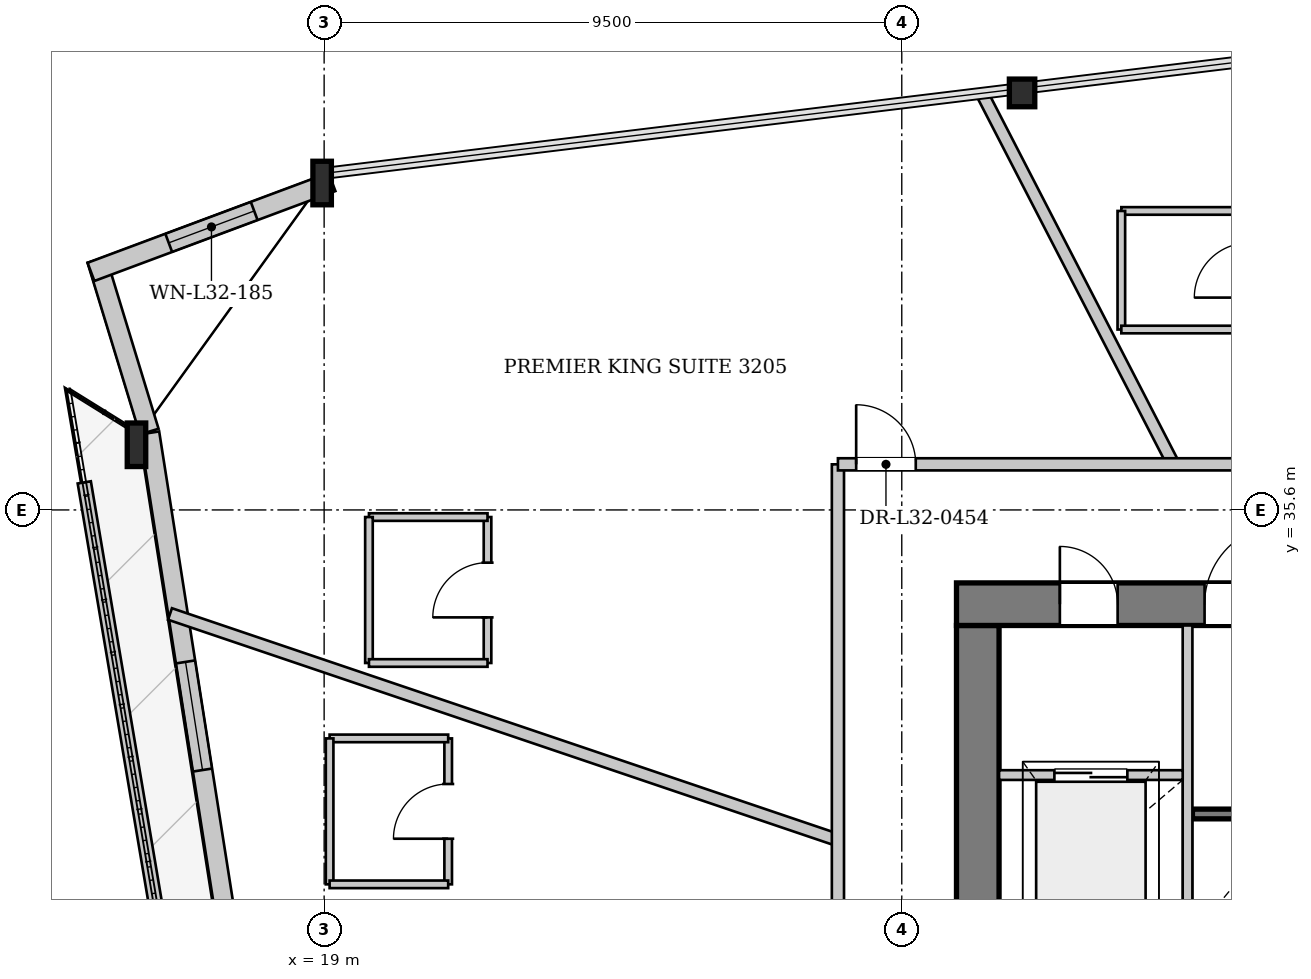
"""IFC4 building model, lengths in metres.
Left out: names, types, materials, properties, quantities, classifications, styles, units other than length and angle.
Written with IfcOpenShell. Run it as: python <this file> out.ifc"""

import sys

from ifc_helpers import new_model, si_unit, direction, frame, frame_2d, origin, origin_2d, place, context, subcontext, project, spatial, rectangle, i_section, extrude, source, transform, mapped, element, fill, save


model = new_model("IFC4")
c1 = context("Model", 3, precision=1e-05, world=origin(), true_north=direction((0.0, 1.0)))
c2 = subcontext(c1, "Body", "Model", "MODEL_VIEW")
j1 = project(units=[si_unit("LENGTHUNIT", "METRE"), si_unit("PLANEANGLEUNIT", "RADIAN")], contexts=[c1])
p1 = place(None, origin())
s1 = spatial("IfcSite", under=j1, at=p1, CompositionType="ELEMENT")
p2 = place(p1, origin())
s2 = spatial("IfcBuilding", under=s1, at=p2, CompositionType="ELEMENT")
p3 = place(p2, frame((0.0, 0.0, 123.45)))
s3 = spatial("IfcBuildingStorey", under=s2, at=p3, CompositionType="ELEMENT", Elevation=123.45)
m1 = source(origin(), c2, "Body", "SweptSolid", [
    extrude(i_section(OverallWidth=0.418, OverallDepth=0.455, WebThickness=0.038, FlangeThickness=0.059, at=origin_2d()), origin(), (0.0, 0.0, 1.0), 3.399),
])
p4 = place(p3, frame((30.602, 42.548, 0.0), z_axis=(-0.072908989981, -0.052724333641, 0.995943986287), x_axis=(0.585985969576, -0.810321197711, 0.0)))
e1 = element("IfcColumn", 1, at=p4, inside=s3, PredefinedType="COLUMN", context=c2, shape_type="MappedRepresentation", body=[
    mapped(m1, transform((0.0, 0.0, 0.0), x_axis=(1.0, 0.0, 0.0), y_axis=(0.0, 1.0, 0.0), z_axis=(0.0, 0.0, 1.0), scale=1.0)),
])
m2 = source(origin(), c2, "Body", "SweptSolid", [
    extrude(i_section(OverallWidth=0.304, OverallDepth=0.716, WebThickness=0.021, FlangeThickness=0.04, at=origin_2d()), origin(), (0.0, 0.0, 1.0), 3.408),
])
p5 = place(p3, frame((19.073, 41.144, 0.0), z_axis=(-0.06224977638, -0.098353214005, 0.993202703699), x_axis=(0.844976677144, -0.534803155454, 0.0)))
e2 = element("IfcColumn", 2, at=p5, inside=s3, PredefinedType="COLUMN", context=c2, shape_type="MappedRepresentation", body=[
    mapped(m2, transform((0.0, 0.0, 0.0), x_axis=(1.0, 0.0, 0.0), y_axis=(0.0, 1.0, 0.0), z_axis=(0.0, 0.0, 1.0), scale=1.0)),
])
m3 = source(origin(), c2, "Body", "SweptSolid", [
    extrude(i_section(OverallWidth=0.304, OverallDepth=0.716, WebThickness=0.021, FlangeThickness=0.04, at=origin_2d()), origin(), (0.0, 0.0, 1.0), 3.404),
])
p6 = place(p3, frame((15.971, 36.842, 0.0), z_axis=(-0.033494892307, -0.099767441541, 0.994446856196), x_axis=(0.947999571076, -0.318271602942, 0.0)))
e3 = element("IfcColumn", 3, at=p6, inside=s3, PredefinedType="COLUMN", context=c2, shape_type="MappedRepresentation", body=[
    mapped(m3, transform((0.0, 0.0, 0.0), x_axis=(1.0, 0.0, 0.0), y_axis=(0.0, 1.0, 0.0), z_axis=(0.0, 0.0, 1.0), scale=1.0)),
])
p7 = place(p3, frame((18.941, 18.965, 0.0), z_axis=(0.0, 0.0, 1.0), x_axis=(-0.155167584453, 0.987888162058, 0.0)))
e4 = element("IfcWall", 4, at=p7, inside=s3, PredefinedType="SOLIDWALL", context=c2, shape_type="SweptSolid", body=[
    extrude(rectangle(XDim=18.121, YDim=0.32, at=frame_2d((9.061, 0.0))), origin(), (0.0, 0.0, 1.0), 2.692),
])
p8 = place(p7, frame((5.249, 0.0, 0.0)))
e5 = element("IfcOpeningElement", 5, at=p8, cuts=e4, PredefinedType="OPENING", context=c2, shape_type="SweptSolid", body=[
    extrude(rectangle(XDim=1.1, YDim=2.3, at=frame_2d((0.55, 1.15))), frame((0.0, 0.17, 0.0), z_axis=(0.0, -1.0, 0.0), x_axis=(1.0, 0.0, 0.0)), (0.0, 0.0, 1.0), 0.34),
])
p9 = place(p7, frame((12.509, 0.0, 0.372)))
e6 = element("IfcOpeningElement", 6, at=p9, cuts=e4, PredefinedType="OPENING", context=c2, shape_type="SweptSolid", body=[
    extrude(rectangle(XDim=1.8, YDim=2.2, at=frame_2d((0.9, 1.1))), frame((0.0, 0.17, 0.0), z_axis=(0.0, -1.0, 0.0), x_axis=(1.0, 0.0, 0.0)), (0.0, 0.0, 1.0), 0.34),
])
p10 = place(p3, frame((16.124, 36.888, 0.0), z_axis=(0.0, 0.0, 1.0), x_axis=(-0.29180664309, 0.956477330128, 0.0)))
e7 = element("IfcWall", 7, at=p10, inside=s3, PredefinedType="SOLIDWALL", context=c2, shape_type="SweptSolid", body=[
    extrude(rectangle(XDim=2.952, YDim=0.32, at=frame_2d((1.476, 0.0))), origin(), (0.0, 0.0, 1.0), 2.692),
])
p11 = place(p3, frame((15.165, 39.515, 0.0), z_axis=(0.0, 0.0, 1.0), x_axis=(0.936906542146, 0.349579935472, 0.0)))
e8 = element("IfcWall", 8, at=p11, inside=s3, PredefinedType="SOLIDWALL", context=c2, shape_type="SweptSolid", body=[
    extrude(rectangle(XDim=4.231, YDim=0.32, at=frame_2d((2.115, 0.0))), origin(), (0.0, 0.0, 1.0), 2.692),
])
p12 = place(p11, frame((1.365, 0.0, 0.272)))
e9 = element("IfcOpeningElement", 9, at=p12, cuts=e8, PredefinedType="OPENING", context=c2, shape_type="SweptSolid", body=[
    extrude(rectangle(XDim=1.5, YDim=2.3, at=frame_2d((0.75, 1.15))), frame((0.0, 0.17, 0.0), z_axis=(0.0, -1.0, 0.0), x_axis=(1.0, 0.0, 0.0)), (0.0, 0.0, 1.0), 0.34),
])
p13 = place(p3, frame((15.055, 36.053, 0.0), z_axis=(0.0, 0.0, 1.0), x_axis=(0.166510572337, -0.986039669232, 0.0)))
e10 = element("IfcWall", 10, at=p13, inside=s3, PredefinedType="PARAPET", context=c2, shape_type="SweptSolid", body=[
    extrude(rectangle(XDim=16.14, YDim=0.22, at=frame_2d((8.07, 0.0))), origin(), (0.0, 0.0, 1.0), 0.3),
])
p14 = place(p3, frame((29.75, 19.5, 0.0), z_axis=(0.0, 0.0, 1.0), x_axis=(0.0, 1.0, 0.0)))
e11 = element("IfcWall", 11, at=p14, inside=s3, PredefinedType="SHEAR", context=c2, shape_type="SweptSolid", body=[
    extrude(rectangle(XDim=14.2, YDim=0.7, at=frame_2d((7.1, 0.0))), origin(), (0.0, 0.0, 1.0), 3.3),
])
p15 = place(p14, frame((7.42, 0.0, 0.0)))
e12 = element("IfcOpeningElement", 12, at=p15, cuts=e11, PredefinedType="OPENING", context=c2, shape_type="SweptSolid", body=[
    extrude(rectangle(XDim=1.6, YDim=2.2, at=frame_2d((0.8, 1.1))), frame((0.0, 0.36, 0.0), z_axis=(0.0, -1.0, 0.0), x_axis=(1.0, 0.0, 0.0)), (0.0, 0.0, 1.0), 0.72),
])
p16 = place(p3, frame((29.4, 34.05, 0.0), z_axis=(0.0, 0.0, 1.0), x_axis=(1.0, 0.0, 0.0)))
e13 = element("IfcWall", 13, at=p16, inside=s3, PredefinedType="SHEAR", context=c2, shape_type="SweptSolid", body=[
    extrude(rectangle(XDim=17.2, YDim=0.7, at=frame_2d((8.6, 0.0))), origin(), (0.0, 0.0, 1.0), 3.3),
])
p17 = place(p16, frame((1.7, 0.0, 0.0)))
e14 = element("IfcOpeningElement", 14, at=p17, cuts=e13, PredefinedType="OPENING", context=c2, shape_type="SweptSolid", body=[
    extrude(rectangle(XDim=0.95, YDim=2.1, at=frame_2d((0.475, 1.05))), frame((0.0, 0.36, 0.0), z_axis=(0.0, -1.0, 0.0), x_axis=(1.0, 0.0, 0.0)), (0.0, 0.0, 1.0), 0.72),
])
p18 = place(p16, frame((4.08, 0.0, 0.0)))
e15 = element("IfcOpeningElement", 15, at=p18, cuts=e13, PredefinedType="OPENING", context=c2, shape_type="SweptSolid", body=[
    extrude(rectangle(XDim=1.32, YDim=2.2, at=frame_2d((0.66, 1.1))), frame((0.0, 0.36, 0.0), z_axis=(0.0, -1.0, 0.0), x_axis=(1.0, 0.0, 0.0)), (0.0, 0.0, 1.0), 0.72),
])
p19 = place(p16, frame((15.15, 0.0, 0.0)))
e16 = element("IfcOpeningElement", 16, at=p19, cuts=e13, PredefinedType="OPENING", context=c2, shape_type="SweptSolid", body=[
    extrude(rectangle(XDim=0.95, YDim=2.1, at=frame_2d((0.475, 1.05))), frame((0.0, 0.36, 0.0), z_axis=(0.0, -1.0, 0.0), x_axis=(1.0, 0.0, 0.0)), (0.0, 0.0, 1.0), 0.72),
])
p20 = place(p3, frame((33.28, 30.6, 0.0), z_axis=(0.0, 0.0, 1.0), x_axis=(1.0, 0.0, 0.0)))
e17 = element("IfcWall", 17, at=p20, inside=s3, PredefinedType="PARTITIONING", context=c2, shape_type="SweptSolid", body=[
    extrude(rectangle(XDim=7.3, YDim=0.16, at=frame_2d((3.65, 0.0))), origin(), (0.0, 0.0, 1.0), 3.3),
])
p21 = place(p3, frame((33.2, 28.44, 0.0), z_axis=(0.0, 0.0, 1.0), x_axis=(0.0, 1.0, 0.0)))
e18 = element("IfcWall", 18, at=p21, inside=s3, PredefinedType="PARTITIONING", context=c2, shape_type="SweptSolid", body=[
    extrude(rectangle(XDim=5.26, YDim=0.16, at=frame_2d((2.63, 0.0))), origin(), (0.0, 0.0, 1.0), 3.3),
])
p22 = place(p3, frame((30.1, 31.24, 0.0), z_axis=(0.0, 0.0, 1.0), x_axis=(1.0, 0.0, 0.0)))
e19 = element("IfcWall", 19, at=p22, inside=s3, PredefinedType="PARTITIONING", context=c2, shape_type="SweptSolid", body=[
    extrude(rectangle(XDim=3.02, YDim=0.16, at=frame_2d((1.51, 0.0))), origin(), (0.0, 0.0, 1.0), 3.3),
])
p23 = place(p22, frame((0.91, 0.0, 0.0)))
e20 = element("IfcOpeningElement", 20, at=p23, cuts=e19, PredefinedType="OPENING", context=c2, shape_type="SweptSolid", body=[
    extrude(rectangle(XDim=1.2, YDim=2.2, at=frame_2d((0.6, 1.1))), frame((0.0, 0.09, 0.0), z_axis=(0.0, -1.0, 0.0), x_axis=(1.0, 0.0, 0.0)), (0.0, 0.0, 1.0), 0.18),
])
p24 = place(p3, frame((32.968, 36.35, 0.0), z_axis=(0.0, 0.0, 1.0), x_axis=(-0.458650198855, 0.88861690007, 0.0)))
e21 = element("IfcWall", 21, at=p24, inside=s3, PredefinedType="PARTITIONING", context=c2, shape_type="SweptSolid", body=[
    extrude(rectangle(XDim=6.835, YDim=0.2, at=frame_2d((3.417, 0.0))), origin(), (0.0, 0.0, 1.0), 3.3),
])
p25 = place(p3, frame((27.45, 30.171, 0.0), z_axis=(0.0, 0.0, 1.0), x_axis=(-0.947210068389, 0.320613609103, 0.0)))
e22 = element("IfcWall", 22, at=p25, inside=s3, PredefinedType="PARTITIONING", context=c2, shape_type="SweptSolid", body=[
    extrude(rectangle(XDim=11.597, YDim=0.2, at=frame_2d((5.799, 0.0))), origin(), (0.0, 0.0, 1.0), 3.3),
])
p26 = place(p3, frame((34.211, 40.517, 0.0), z_axis=(0.0, 0.0, 1.0), x_axis=(-1.0, 0.0, 0.0)))
e23 = element("IfcWall", 23, at=p26, inside=s3, PredefinedType="PARTITIONING", context=c2, shape_type="SweptSolid", body=[
    extrude(rectangle(XDim=2.1, YDim=0.125, at=frame_2d((1.05, 0.0))), origin(), (0.0, 0.0, 1.0), 3.3),
])
p27 = place(p3, frame((32.111, 40.517, 0.0), z_axis=(0.0, 0.0, 1.0), x_axis=(0.0, -1.0, 0.0)))
e24 = element("IfcWall", 24, at=p27, inside=s3, PredefinedType="PARTITIONING", context=c2, shape_type="SweptSolid", body=[
    extrude(rectangle(XDim=1.95, YDim=0.125, at=frame_2d((0.975, 0.0))), origin(), (0.0, 0.0, 1.0), 3.3),
])
p28 = place(p3, frame((32.111, 38.567, 0.0), z_axis=(0.0, 0.0, 1.0), x_axis=(1.0, 0.0, 0.0)))
e25 = element("IfcWall", 25, at=p28, inside=s3, PredefinedType="PARTITIONING", context=c2, shape_type="SweptSolid", body=[
    extrude(rectangle(XDim=2.1, YDim=0.125, at=frame_2d((1.05, 0.0))), origin(), (0.0, 0.0, 1.0), 3.3),
])
p29 = place(p3, frame((21.687, 33.083, 0.0), z_axis=(0.0, 0.0, 1.0), x_axis=(0.0, 1.0, 0.0)))
e26 = element("IfcWall", 26, at=p29, inside=s3, PredefinedType="PARTITIONING", context=c2, shape_type="SweptSolid", body=[
    extrude(rectangle(XDim=2.4, YDim=0.125, at=frame_2d((1.2, 0.0))), origin(), (0.0, 0.0, 1.0), 2.925),
])
p30 = place(p29, frame((0.75, 0.0, 0.0)))
e27 = element("IfcOpeningElement", 27, at=p30, cuts=e26, PredefinedType="OPENING", context=c2, shape_type="SweptSolid", body=[
    extrude(rectangle(XDim=0.9, YDim=2.1, at=frame_2d((0.45, 1.05))), frame((0.0, 0.073, 0.0), z_axis=(0.0, -1.0, 0.0), x_axis=(1.0, 0.0, 0.0)), (0.0, 0.0, 1.0), 0.145),
])
p31 = place(p3, frame((21.687, 35.483, 0.0), z_axis=(0.0, 0.0, 1.0), x_axis=(-1.0, 0.0, 0.0)))
e28 = element("IfcWall", 28, at=p31, inside=s3, PredefinedType="PARTITIONING", context=c2, shape_type="SweptSolid", body=[
    extrude(rectangle(XDim=1.95, YDim=0.125, at=frame_2d((0.975, 0.0))), origin(), (0.0, 0.0, 1.0), 3.3),
])
p32 = place(p3, frame((19.737, 35.483, 0.0), z_axis=(0.0, 0.0, 1.0), x_axis=(0.0, -1.0, 0.0)))
e29 = element("IfcWall", 29, at=p32, inside=s3, PredefinedType="PARTITIONING", context=c2, shape_type="SweptSolid", body=[
    extrude(rectangle(XDim=2.4, YDim=0.125, at=frame_2d((1.2, 0.0))), origin(), (0.0, 0.0, 1.0), 3.3),
])
p33 = place(p3, frame((19.737, 33.083, 0.0), z_axis=(0.0, 0.0, 1.0), x_axis=(1.0, 0.0, 0.0)))
e30 = element("IfcWall", 30, at=p33, inside=s3, PredefinedType="PARTITIONING", context=c2, shape_type="SweptSolid", body=[
    extrude(rectangle(XDim=1.95, YDim=0.125, at=frame_2d((0.975, 0.0))), origin(), (0.0, 0.0, 1.0), 3.3),
])
p34 = place(p3, frame((21.04, 29.443, 0.0), z_axis=(0.0, 0.0, 1.0), x_axis=(0.0, 1.0, 0.0)))
e31 = element("IfcWall", 31, at=p34, inside=s3, PredefinedType="PARTITIONING", context=c2, shape_type="SweptSolid", body=[
    extrude(rectangle(XDim=2.4, YDim=0.125, at=frame_2d((1.2, 0.0))), origin(), (0.0, 0.0, 1.0), 3.3),
])
p35 = place(p34, frame((0.75, 0.0, 0.0)))
e32 = element("IfcOpeningElement", 32, at=p35, cuts=e31, PredefinedType="OPENING", context=c2, shape_type="SweptSolid", body=[
    extrude(rectangle(XDim=0.9, YDim=2.1, at=frame_2d((0.45, 1.05))), frame((0.0, 0.073, 0.0), z_axis=(0.0, -1.0, 0.0), x_axis=(1.0, 0.0, 0.0)), (0.0, 0.0, 1.0), 0.145),
])
p36 = place(p3, frame((21.04, 31.843, 0.0), z_axis=(0.0, 0.0, 1.0), x_axis=(-1.0, 0.0, 0.0)))
e33 = element("IfcWall", 33, at=p36, inside=s3, PredefinedType="PARTITIONING", context=c2, shape_type="SweptSolid", body=[
    extrude(rectangle(XDim=1.95, YDim=0.125, at=frame_2d((0.975, 0.0))), origin(), (0.0, 0.0, 1.0), 3.3),
])
p37 = place(p3, frame((19.09, 31.843, 0.0), z_axis=(0.0, 0.0, 1.0), x_axis=(0.0, -1.0, 0.0)))
e34 = element("IfcWall", 34, at=p37, inside=s3, PredefinedType="PARTITIONING", context=c2, shape_type="SweptSolid", body=[
    extrude(rectangle(XDim=2.4, YDim=0.125, at=frame_2d((1.2, 0.0))), origin(), (0.0, 0.0, 1.0), 3.3),
])
p38 = place(p3, frame((19.09, 29.443, 0.0), z_axis=(0.0, 0.0, 1.0), x_axis=(1.0, 0.0, 0.0)))
e35 = element("IfcWall", 35, at=p38, inside=s3, PredefinedType="PARTITIONING", context=c2, shape_type="SweptSolid", body=[
    extrude(rectangle(XDim=1.95, YDim=0.125, at=frame_2d((0.975, 0.0))), origin(), (0.0, 0.0, 1.0), 3.3),
])
p39 = place(p3, frame((27.45, 16.85, 0.0), z_axis=(0.0, 0.0, 1.0), x_axis=(0.0, 1.0, 0.0)))
e36 = element("IfcWall", 36, at=p39, inside=s3, PredefinedType="PARTITIONING", context=c2, shape_type="SweptSolid", body=[
    extrude(rectangle(XDim=19.5, YDim=0.2, at=frame_2d((9.75, 0.0))), origin(), (0.0, 0.0, 1.0), 3.3),
])
p40 = place(p39, frame((8.124, 0.0, 0.0)))
e37 = element("IfcOpeningElement", 37, at=p40, cuts=e36, PredefinedType="OPENING", context=c2, shape_type="SweptSolid", body=[
    extrude(rectangle(XDim=0.98, YDim=2.15, at=frame_2d((0.49, 1.075))), frame((0.0, 0.11, 0.0), z_axis=(0.0, -1.0, 0.0), x_axis=(1.0, 0.0, 0.0)), (0.0, 0.0, 1.0), 0.22),
])
p41 = place(p3, frame((27.45, 36.35, 0.0), z_axis=(0.0, 0.0, 1.0), x_axis=(1.0, 0.0, 0.0)))
e38 = element("IfcWall", 38, at=p41, inside=s3, PredefinedType="PARTITIONING", context=c2, shape_type="SweptSolid", body=[
    extrude(rectangle(XDim=21.1, YDim=0.2, at=frame_2d((10.55, 0.0))), origin(), (0.0, 0.0, 1.0), 3.3),
])
p42 = place(p41, frame((19.788, 0.0, 0.0)))
e39 = element("IfcOpeningElement", 39, at=p42, cuts=e38, PredefinedType="OPENING", context=c2, shape_type="SweptSolid", body=[
    extrude(rectangle(XDim=0.98, YDim=2.15, at=frame_2d((0.49, 1.075))), frame((0.0, 0.11, 0.0), z_axis=(0.0, -1.0, 0.0), x_axis=(1.0, 0.0, 0.0)), (0.0, 0.0, 1.0), 0.22),
])
p43 = place(p41, frame((10.147, 0.0, 0.0)))
e40 = element("IfcOpeningElement", 40, at=p43, cuts=e38, PredefinedType="OPENING", context=c2, shape_type="SweptSolid", body=[
    extrude(rectangle(XDim=0.98, YDim=2.15, at=frame_2d((0.49, 1.075))), frame((0.0, 0.11, 0.0), z_axis=(0.0, -1.0, 0.0), x_axis=(1.0, 0.0, 0.0)), (0.0, 0.0, 1.0), 0.22),
])
p44 = place(p41, frame((0.3, 0.0, 0.0)))
e41 = element("IfcOpeningElement", 41, at=p44, cuts=e38, PredefinedType="OPENING", context=c2, shape_type="SweptSolid", body=[
    extrude(rectangle(XDim=0.98, YDim=2.15, at=frame_2d((0.49, 1.075))), frame((0.0, 0.11, 0.0), z_axis=(0.0, -1.0, 0.0), x_axis=(1.0, 0.0, 0.0)), (0.0, 0.0, 1.0), 0.22),
])
m4 = source(origin(), c2, "Body", "SweptSolid", [
    extrude(rectangle(XDim=1.8, YDim=2.2, at=frame_2d((0.9, 1.1))), frame((0.0, 0.03, 0.0), z_axis=(0.0, -1.0, 0.0), x_axis=(1.0, 0.0, 0.0)), (0.0, 0.0, 1.0), 0.06),
])
p45 = place(p9, origin())
e42 = element("IfcWindow", 42, at=p45, inside=s3, PartitioningType="SINGLE_PANEL", PredefinedType="WINDOW", context=c2, shape_type="MappedRepresentation", body=[
    mapped(m4, transform((0.0, 0.0, 0.0), x_axis=(1.0, 0.0, 0.0), y_axis=(0.0, 1.0, 0.0), z_axis=(0.0, 0.0, 1.0), scale=1.0)),
])
fill(e6, e42)
m5 = source(origin(), c2, "Body", "SweptSolid", [
    extrude(rectangle(XDim=1.5, YDim=2.3, at=frame_2d((0.75, 1.15))), frame((0.0, 0.03, 0.0), z_axis=(0.0, -1.0, 0.0), x_axis=(1.0, 0.0, 0.0)), (0.0, 0.0, 1.0), 0.06),
])
p46 = place(p12, origin())
e43 = element("IfcWindow", 43, at=p46, inside=s3, PartitioningType="SINGLE_PANEL", PredefinedType="WINDOW", context=c2, shape_type="MappedRepresentation", body=[
    mapped(m5, transform((0.0, 0.0, 0.0), x_axis=(1.0, 0.0, 0.0), y_axis=(0.0, 1.0, 0.0), z_axis=(0.0, 0.0, 1.0), scale=1.0)),
])
fill(e9, e43)
m6 = source(origin(), c2, "Body", "SweptSolid", [
    extrude(rectangle(XDim=0.95, YDim=2.1, at=frame_2d((0.475, 1.05))), frame((0.0, 0.025, 0.0), z_axis=(0.0, -1.0, 0.0), x_axis=(1.0, 0.0, 0.0)), (0.0, 0.0, 1.0), 0.05),
])
p47 = place(p17, origin())
e44 = element("IfcDoor", 44, at=p47, inside=s3, OperationType="SINGLE_SWING_LEFT", PredefinedType="DOOR", context=c2, shape_type="MappedRepresentation", body=[
    mapped(m6, transform((0.0, 0.0, 0.0), x_axis=(1.0, 0.0, 0.0), y_axis=(0.0, 1.0, 0.0), z_axis=(0.0, 0.0, 1.0), scale=1.0)),
])
fill(e14, e44)
m7 = source(origin(), c2, "Body", "SweptSolid", [
    extrude(rectangle(XDim=1.32, YDim=2.2, at=frame_2d((0.66, 1.1))), frame((0.0, 0.025, 0.0), z_axis=(0.0, -1.0, 0.0), x_axis=(1.0, 0.0, 0.0)), (0.0, 0.0, 1.0), 0.05),
])
p48 = place(p18, origin())
e45 = element("IfcDoor", 45, at=p48, inside=s3, OperationType="SINGLE_SWING_RIGHT", PredefinedType="DOOR", context=c2, shape_type="MappedRepresentation", body=[
    mapped(m7, transform((0.0, 0.0, 0.0), x_axis=(1.0, 0.0, 0.0), y_axis=(0.0, 1.0, 0.0), z_axis=(0.0, 0.0, 1.0), scale=1.0)),
])
fill(e15, e45)
m8 = source(origin(), c2, "Body", "SweptSolid", [
    extrude(rectangle(XDim=1.2, YDim=2.2, at=frame_2d((0.6, 1.1))), frame((0.0, 0.025, 0.0), z_axis=(0.0, -1.0, 0.0), x_axis=(1.0, 0.0, 0.0)), (0.0, 0.0, 1.0), 0.05),
])
p49 = place(p23, origin())
e46 = element("IfcDoor", 46, at=p49, inside=s3, OperationType="DOUBLE_DOOR_SLIDING", PredefinedType="DOOR", context=c2, shape_type="MappedRepresentation", body=[
    mapped(m8, transform((0.0, 0.0, 0.0), x_axis=(1.0, 0.0, 0.0), y_axis=(0.0, 1.0, 0.0), z_axis=(0.0, 0.0, 1.0), scale=1.0)),
])
fill(e20, e46)
m9 = source(origin(), c2, "Body", "SweptSolid", [
    extrude(rectangle(XDim=0.9, YDim=2.1, at=frame_2d((0.45, 1.05))), frame((0.0, 0.025, 0.0), z_axis=(0.0, -1.0, 0.0), x_axis=(1.0, 0.0, 0.0)), (0.0, 0.0, 1.0), 0.05),
])
p50 = place(p30, origin())
e47 = element("IfcDoor", 47, at=p50, inside=s3, OperationType="SINGLE_SWING_LEFT", PredefinedType="DOOR", context=c2, shape_type="MappedRepresentation", body=[
    mapped(m9, transform((0.0, 0.0, 0.0), x_axis=(1.0, 0.0, 0.0), y_axis=(0.0, 1.0, 0.0), z_axis=(0.0, 0.0, 1.0), scale=1.0)),
])
fill(e27, e47)
p51 = place(p35, origin())
e48 = element("IfcDoor", 48, at=p51, inside=s3, OperationType="SINGLE_SWING_LEFT", PredefinedType="DOOR", context=c2, shape_type="MappedRepresentation", body=[
    mapped(m9, transform((0.0, 0.0, 0.0), x_axis=(1.0, 0.0, 0.0), y_axis=(0.0, 1.0, 0.0), z_axis=(0.0, 0.0, 1.0), scale=1.0)),
])
fill(e32, e48)
m10 = source(origin(), c2, "Body", "SweptSolid", [
    extrude(rectangle(XDim=0.98, YDim=2.15, at=frame_2d((0.49, 1.075))), frame((0.0, 0.025, 0.0), z_axis=(0.0, -1.0, 0.0), x_axis=(1.0, 0.0, 0.0)), (0.0, 0.0, 1.0), 0.05),
])
p52 = place(p44, origin())
e49 = element("IfcDoor", 49, at=p52, inside=s3, OperationType="SINGLE_SWING_LEFT", PredefinedType="DOOR", context=c2, shape_type="MappedRepresentation", body=[
    mapped(m10, transform((0.0, 0.0, 0.0), x_axis=(1.0, 0.0, 0.0), y_axis=(0.0, 1.0, 0.0), z_axis=(0.0, 0.0, 1.0), scale=1.0)),
])
fill(e41, e49)
save(model, sys.argv[1])
